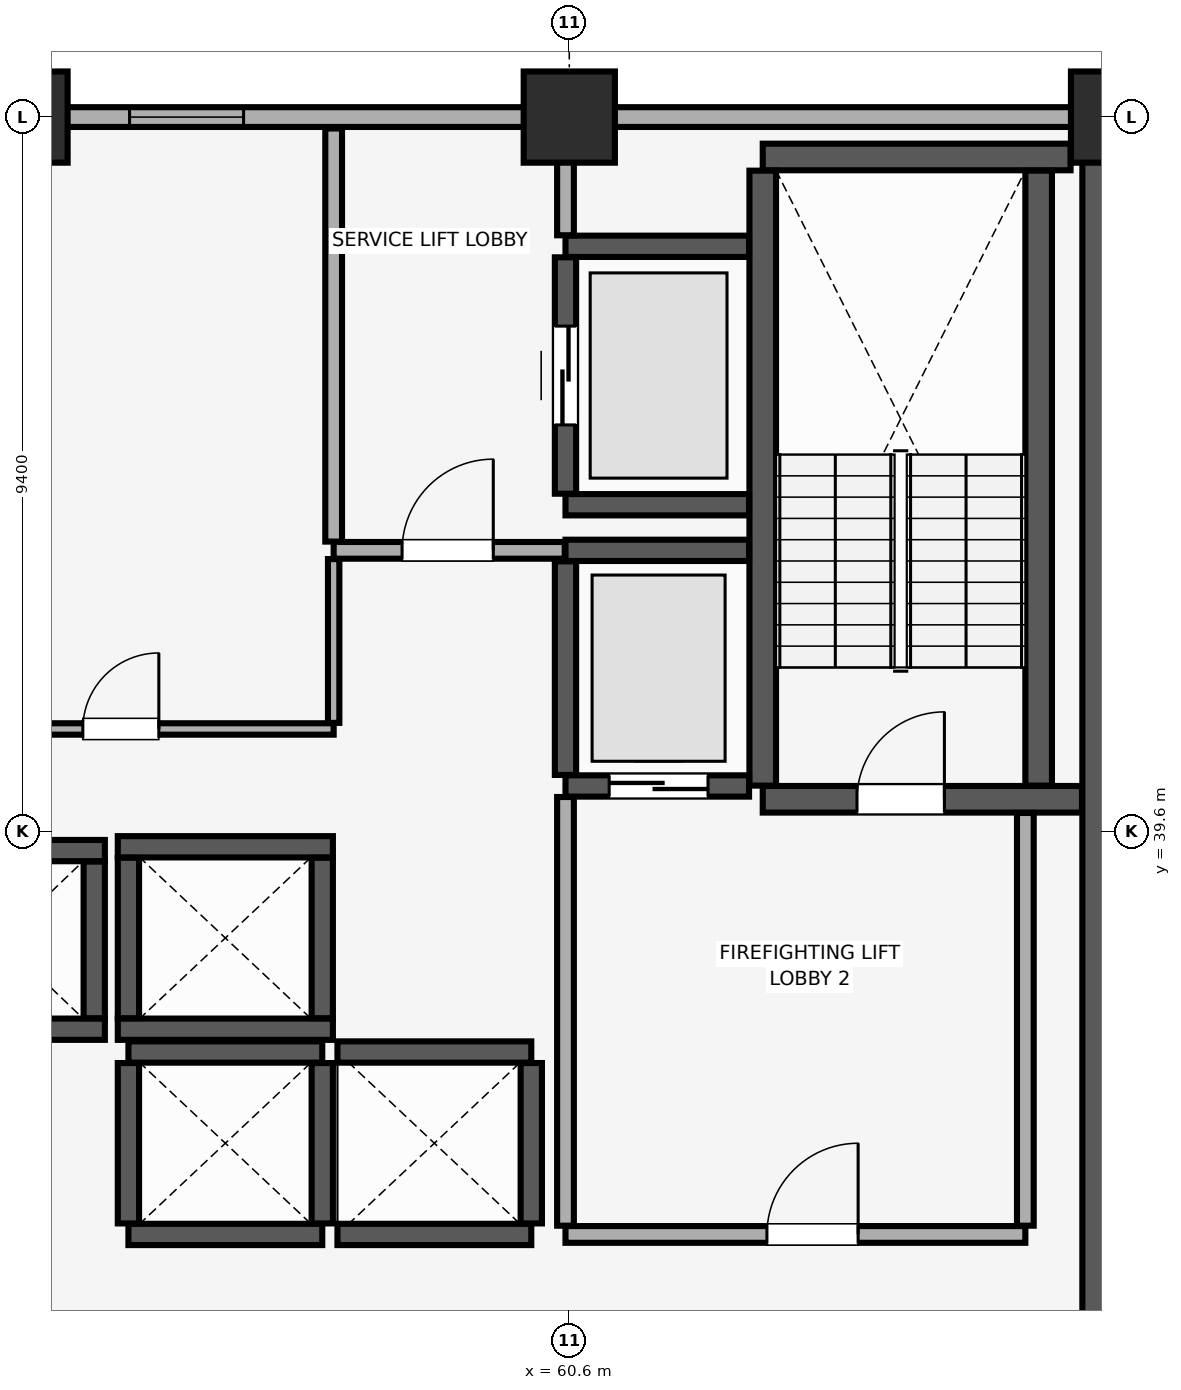
"""IFC4 building model, lengths in metres.
Left out: names, types, materials, properties, quantities, classifications, styles, units other than length and angle.
Written with IfcOpenShell. Run it as: python <this file> out.ifc"""

import sys

from ifc_helpers import new_model, si_unit, direction, frame, frame_2d, origin, origin_2d, place, context, subcontext, project, spatial, rectangle, extrude, element, fill, save


model = new_model("IFC4")
c1 = context("Model", 3, precision=1e-05, world=origin(), true_north=direction((0.0, 1.0)))
c2 = subcontext(c1, "Body", "Model", "MODEL_VIEW")
j1 = project(units=[si_unit("LENGTHUNIT", "METRE"), si_unit("PLANEANGLEUNIT", "RADIAN")], contexts=[c1])
p1 = place(None, origin())
s1 = spatial("IfcSite", under=j1, at=p1, CompositionType="ELEMENT")
p2 = place(p1, origin())
s2 = spatial("IfcBuilding", under=s1, at=p2, CompositionType="ELEMENT")
p3 = place(p2, frame((0.0, 0.0, 126.8)))
s3 = spatial("IfcBuildingStorey", under=s2, at=p3, CompositionType="ELEMENT", Elevation=126.8)
for number, where, z_axis, x_axis in (
    (1, (53.4, 49.0, 0.0), (0.0, 0.0, 1.0), (1.0, 0.0, 0.0)),
    (2, (60.6, 49.0, 0.0), (0.0, 0.0, 1.0), (1.0, 0.0, 0.0)),
    (3, (67.8, 49.0, 0.0), (0.0, 0.0, 1.0), (1.0, 0.0, 0.0)),
):
    element("IfcColumn", number, at=place(p3, frame(where, z_axis=z_axis, x_axis=x_axis)), inside=s3, PredefinedType="COLUMN", context=c2, shape_type="SweptSolid", body=[
        extrude(rectangle(XDim=1.2, YDim=1.2, at=origin_2d()), origin(), (0.0, 0.0, 1.0), 3.51),
    ])
p4 = place(p3, frame((79.8, 49.0, 0.0), z_axis=(0.0, 0.0, 1.0), x_axis=(-1.0, 0.0, 0.0)))
e4 = element("IfcWall", 4, at=p4, inside=s3, PredefinedType="SOLIDWALL", context=c2, shape_type="SweptSolid", body=[
    extrude(rectangle(XDim=75.6, YDim=0.26, at=frame_2d((37.8, 0.0))), origin(), (0.0, 0.0, 1.0), 2.56),
])
p5 = place(p4, frame((72.565, 0.0, 0.85)))
e5 = element("IfcOpeningElement", 5, at=p5, cuts=e4, PredefinedType="OPENING", context=c2, shape_type="SweptSolid", body=[
    extrude(rectangle(XDim=1.5, YDim=1.4, at=frame_2d((0.75, 0.7))), frame((0.0, 0.14, 0.0), z_axis=(0.0, -1.0, 0.0), x_axis=(1.0, 0.0, 0.0)), (0.0, 0.0, 1.0), 0.28),
])
p6 = place(p4, frame((67.45, 0.0, 0.85)))
e6 = element("IfcOpeningElement", 6, at=p6, cuts=e4, PredefinedType="OPENING", context=c2, shape_type="SweptSolid", body=[
    extrude(rectangle(XDim=1.5, YDim=1.4, at=frame_2d((0.75, 0.7))), frame((0.0, 0.14, 0.0), z_axis=(0.0, -1.0, 0.0), x_axis=(1.0, 0.0, 0.0)), (0.0, 0.0, 1.0), 0.28),
])
p7 = place(p4, frame((7.6, 0.0, 0.85)))
e7 = element("IfcOpeningElement", 7, at=p7, cuts=e4, PredefinedType="OPENING", context=c2, shape_type="SweptSolid", body=[
    extrude(rectangle(XDim=1.5, YDim=1.4, at=frame_2d((0.75, 0.7))), frame((0.0, 0.14, 0.0), z_axis=(0.0, -1.0, 0.0), x_axis=(1.0, 0.0, 0.0)), (0.0, 0.0, 1.0), 0.28),
])
p8 = place(p4, frame((1.535, 0.0, 0.85)))
e8 = element("IfcOpeningElement", 8, at=p8, cuts=e4, PredefinedType="OPENING", context=c2, shape_type="SweptSolid", body=[
    extrude(rectangle(XDim=1.5, YDim=1.4, at=frame_2d((0.75, 0.7))), frame((0.0, 0.14, 0.0), z_axis=(0.0, -1.0, 0.0), x_axis=(1.0, 0.0, 0.0)), (0.0, 0.0, 1.0), 0.28),
])
p9 = place(p4, frame((52.265, 0.0, 0.9)))
e9 = element("IfcOpeningElement", 9, at=p9, cuts=e4, PredefinedType="OPENING", context=c2, shape_type="SweptSolid", body=[
    extrude(rectangle(XDim=1.5, YDim=1.4, at=frame_2d((0.75, 0.7))), frame((0.0, 0.14, 0.0), z_axis=(0.0, -1.0, 0.0), x_axis=(1.0, 0.0, 0.0)), (0.0, 0.0, 1.0), 0.28),
])
p10 = place(p4, frame((45.5, 0.0, 0.9)))
e10 = element("IfcOpeningElement", 10, at=p10, cuts=e4, PredefinedType="OPENING", context=c2, shape_type="SweptSolid", body=[
    extrude(rectangle(XDim=1.5, YDim=1.4, at=frame_2d((0.75, 0.7))), frame((0.0, 0.14, 0.0), z_axis=(0.0, -1.0, 0.0), x_axis=(1.0, 0.0, 0.0)), (0.0, 0.0, 1.0), 0.28),
])
p11 = place(p4, frame((31.05, 0.0, 0.9)))
e11 = element("IfcOpeningElement", 11, at=p11, cuts=e4, PredefinedType="OPENING", context=c2, shape_type="SweptSolid", body=[
    extrude(rectangle(XDim=1.5, YDim=1.4, at=frame_2d((0.75, 0.7))), frame((0.0, 0.14, 0.0), z_axis=(0.0, -1.0, 0.0), x_axis=(1.0, 0.0, 0.0)), (0.0, 0.0, 1.0), 0.28),
])
p12 = place(p4, frame((27.85, 0.0, 0.9)))
e12 = element("IfcOpeningElement", 12, at=p12, cuts=e4, PredefinedType="OPENING", context=c2, shape_type="SweptSolid", body=[
    extrude(rectangle(XDim=1.5, YDim=1.4, at=frame_2d((0.75, 0.7))), frame((0.0, 0.14, 0.0), z_axis=(0.0, -1.0, 0.0), x_axis=(1.0, 0.0, 0.0)), (0.0, 0.0, 1.0), 0.28),
])
p13 = place(p4, frame((23.485, 0.0, 0.9)))
e13 = element("IfcOpeningElement", 13, at=p13, cuts=e4, PredefinedType="OPENING", context=c2, shape_type="SweptSolid", body=[
    extrude(rectangle(XDim=1.5, YDim=1.4, at=frame_2d((0.75, 0.7))), frame((0.0, 0.14, 0.0), z_axis=(0.0, -1.0, 0.0), x_axis=(1.0, 0.0, 0.0)), (0.0, 0.0, 1.0), 0.28),
])
p14 = place(p3, frame((67.8, 29.4, 0.0), z_axis=(0.0, 0.0, 1.0), x_axis=(0.0, 1.0, 0.0)))
e14 = element("IfcWall", 14, at=p14, inside=s3, PredefinedType="SHEAR", context=c2, shape_type="SweptSolid", body=[
    extrude(rectangle(XDim=19.2, YDim=0.9, at=frame_2d((9.6, 0.0))), origin(), (0.0, 0.0, 1.0), 3.51),
])
p15 = place(p3, frame((63.145, 40.025, 0.0), z_axis=(0.0, 0.0, 1.0), x_axis=(1.0, 0.0, 0.0)))
e15 = element("IfcWall", 15, at=p15, inside=s3, PredefinedType="SHEAR", context=c2, shape_type="SweptSolid", body=[
    extrude(rectangle(XDim=4.2, YDim=0.35, at=frame_2d((2.1, 0.0))), origin(), (0.0, 0.0, 1.0), 3.51),
])
p16 = place(p15, frame((1.24, 0.0, 0.0)))
e16 = element("IfcOpeningElement", 16, at=p16, cuts=e15, PredefinedType="OPENING", context=c2, shape_type="SweptSolid", body=[
    extrude(rectangle(XDim=1.15, YDim=2.15, at=frame_2d((0.575, 1.075))), frame((0.0, 0.185, 0.0), z_axis=(0.0, -1.0, 0.0), x_axis=(1.0, 0.0, 0.0)), (0.0, 0.0, 1.0), 0.37),
])
p17 = place(p3, frame((63.145, 48.475, 0.0), z_axis=(0.0, 0.0, 1.0), x_axis=(1.0, 0.0, 0.0)))
e17 = element("IfcWall", 17, at=p17, inside=s3, PredefinedType="SHEAR", context=c2, shape_type="SweptSolid", body=[
    extrude(rectangle(XDim=4.05, YDim=0.35, at=frame_2d((2.025, 0.0))), origin(), (0.0, 0.0, 1.0), 3.51),
])
for number, where, z_axis, x_axis in (
    (18, (63.145, 40.205, 0.0), (0.0, 0.0, 1.0), (0.0, 1.0, 0.0)),
    (19, (66.775, 40.205, 0.0), (0.0, 0.0, 1.0), (0.0, 1.0, 0.0)),
):
    element("IfcWall", number, at=place(p3, frame(where, z_axis=z_axis, x_axis=x_axis)), inside=s3, PredefinedType="SHEAR", context=c2, shape_type="SweptSolid", body=[
        extrude(rectangle(XDim=8.09, YDim=0.35, at=frame_2d((4.045, 0.0))), origin(), (0.0, 0.0, 1.0), 3.51),
    ])
for number, where, z_axis, x_axis in (
    (20, (51.9, 37.0, 0.0), (0.0, 0.0, 1.0), (1.0, 0.0, 0.0)),
    (21, (51.9, 39.35, 0.0), (0.0, 0.0, 1.0), (1.0, 0.0, 0.0)),
):
    element("IfcWall", number, at=place(p3, frame(where, z_axis=z_axis, x_axis=x_axis)), inside=s3, PredefinedType="SHEAR", context=c2, shape_type="SweptSolid", body=[
        extrude(rectangle(XDim=2.59, YDim=0.28, at=frame_2d((1.295, 0.0))), origin(), (0.0, 0.0, 1.0), 3.51),
    ])
p18 = place(p3, frame((54.35, 37.145, 0.0), z_axis=(0.0, 0.0, 1.0), x_axis=(0.0, 1.0, 0.0)))
e22 = element("IfcWall", 22, at=p18, inside=s3, PredefinedType="SHEAR", context=c2, shape_type="SweptSolid", body=[
    extrude(rectangle(XDim=2.06, YDim=0.28, at=frame_2d((1.03, 0.0))), origin(), (0.0, 0.0, 1.0), 3.51),
])
for number, where, z_axis, x_axis in (
    (23, (54.8, 34.3, 0.0), (0.0, 0.0, 1.0), (1.0, 0.0, 0.0)),
    (24, (54.8, 36.7, 0.0), (0.0, 0.0, 1.0), (1.0, 0.0, 0.0)),
):
    element("IfcWall", number, at=place(p3, frame(where, z_axis=z_axis, x_axis=x_axis)), inside=s3, PredefinedType="SHEAR", context=c2, shape_type="SweptSolid", body=[
        extrude(rectangle(XDim=2.55, YDim=0.28, at=frame_2d((1.275, 0.0))), origin(), (0.0, 0.0, 1.0), 3.51),
    ])
for number, where, z_axis, x_axis in (
    (25, (54.8, 34.445, 0.0), (0.0, 0.0, 1.0), (0.0, 1.0, 0.0)),
    (26, (57.35, 34.445, 0.0), (0.0, 0.0, 1.0), (0.0, 1.0, 0.0)),
):
    element("IfcWall", number, at=place(p3, frame(where, z_axis=z_axis, x_axis=x_axis)), inside=s3, PredefinedType="SHEAR", context=c2, shape_type="SweptSolid", body=[
        extrude(rectangle(XDim=2.11, YDim=0.28, at=frame_2d((1.055, 0.0))), origin(), (0.0, 0.0, 1.0), 3.51),
    ])
for number, where, z_axis, x_axis in (
    (27, (57.55, 34.3, 0.0), (0.0, 0.0, 1.0), (1.0, 0.0, 0.0)),
    (28, (57.55, 36.7, 0.0), (0.0, 0.0, 1.0), (1.0, 0.0, 0.0)),
):
    element("IfcWall", number, at=place(p3, frame(where, z_axis=z_axis, x_axis=x_axis)), inside=s3, PredefinedType="SHEAR", context=c2, shape_type="SweptSolid", body=[
        extrude(rectangle(XDim=2.55, YDim=0.28, at=frame_2d((1.275, 0.0))), origin(), (0.0, 0.0, 1.0), 3.51),
    ])
p19 = place(p3, frame((60.1, 34.445, 0.0), z_axis=(0.0, 0.0, 1.0), x_axis=(0.0, 1.0, 0.0)))
e29 = element("IfcWall", 29, at=p19, inside=s3, PredefinedType="SHEAR", context=c2, shape_type="SweptSolid", body=[
    extrude(rectangle(XDim=2.11, YDim=0.28, at=frame_2d((1.055, 0.0))), origin(), (0.0, 0.0, 1.0), 3.51),
])
for number, where, z_axis, x_axis in (
    (30, (54.66, 37.0, 0.0), (0.0, 0.0, 1.0), (1.0, 0.0, 0.0)),
    (31, (54.66, 39.4, 0.0), (0.0, 0.0, 1.0), (1.0, 0.0, 0.0)),
):
    element("IfcWall", number, at=place(p3, frame(where, z_axis=z_axis, x_axis=x_axis)), inside=s3, PredefinedType="SHEAR", context=c2, shape_type="SweptSolid", body=[
        extrude(rectangle(XDim=2.83, YDim=0.28, at=frame_2d((1.415, 0.0))), origin(), (0.0, 0.0, 1.0), 3.51),
    ])
for number, where, z_axis, x_axis in (
    (32, (54.8, 37.145, 0.0), (0.0, 0.0, 1.0), (0.0, 1.0, 0.0)),
    (33, (57.35, 37.145, 0.0), (0.0, 0.0, 1.0), (0.0, 1.0, 0.0)),
):
    element("IfcWall", number, at=place(p3, frame(where, z_axis=z_axis, x_axis=x_axis)), inside=s3, PredefinedType="SHEAR", context=c2, shape_type="SweptSolid", body=[
        extrude(rectangle(XDim=2.11, YDim=0.28, at=frame_2d((1.055, 0.0))), origin(), (0.0, 0.0, 1.0), 3.51),
    ])
p20 = place(p3, frame((60.55, 40.2, 0.0), z_axis=(0.0, 0.0, 1.0), x_axis=(1.0, 0.0, 0.0)))
e34 = element("IfcWall", 34, at=p20, inside=s3, PredefinedType="SHEAR", context=c2, shape_type="SweptSolid", body=[
    extrude(rectangle(XDim=2.415, YDim=0.28, at=frame_2d((1.208, 0.0))), origin(), (0.0, 0.0, 1.0), 3.51),
])
p21 = place(p20, frame((0.575, 0.0, 0.0)))
e35 = element("IfcOpeningElement", 35, at=p21, cuts=e34, PredefinedType="OPENING", context=c2, shape_type="SweptSolid", body=[
    extrude(rectangle(XDim=1.3, YDim=2.3, at=frame_2d((0.65, 1.15))), frame((0.0, 0.15, 0.0), z_axis=(0.0, -1.0, 0.0), x_axis=(1.0, 0.0, 0.0)), (0.0, 0.0, 1.0), 0.3),
])
p22 = place(p3, frame((60.55, 43.3, 0.0), z_axis=(0.0, 0.0, 1.0), x_axis=(1.0, 0.0, 0.0)))
e36 = element("IfcWall", 36, at=p22, inside=s3, PredefinedType="SHEAR", context=c2, shape_type="SweptSolid", body=[
    extrude(rectangle(XDim=2.415, YDim=0.28, at=frame_2d((1.208, 0.0))), origin(), (0.0, 0.0, 1.0), 3.51),
])
p23 = place(p3, frame((60.55, 40.345, 0.0), z_axis=(0.0, 0.0, 1.0), x_axis=(0.0, 1.0, 0.0)))
e37 = element("IfcWall", 37, at=p23, inside=s3, PredefinedType="SHEAR", context=c2, shape_type="SweptSolid", body=[
    extrude(rectangle(XDim=2.81, YDim=0.28, at=frame_2d((1.405, 0.0))), origin(), (0.0, 0.0, 1.0), 3.51),
])
for number, where, z_axis, x_axis in (
    (38, (60.55, 43.9, 0.0), (0.0, 0.0, 1.0), (1.0, 0.0, 0.0)),
    (39, (60.55, 47.3, 0.0), (0.0, 0.0, 1.0), (1.0, 0.0, 0.0)),
):
    element("IfcWall", number, at=place(p3, frame(where, z_axis=z_axis, x_axis=x_axis)), inside=s3, PredefinedType="SHEAR", context=c2, shape_type="SweptSolid", body=[
        extrude(rectangle(XDim=2.415, YDim=0.28, at=frame_2d((1.208, 0.0))), origin(), (0.0, 0.0, 1.0), 3.51),
    ])
p24 = place(p3, frame((60.55, 44.045, 0.0), z_axis=(0.0, 0.0, 1.0), x_axis=(0.0, 1.0, 0.0)))
e40 = element("IfcWall", 40, at=p24, inside=s3, PredefinedType="SHEAR", context=c2, shape_type="SweptSolid", body=[
    extrude(rectangle(XDim=3.11, YDim=0.28, at=frame_2d((1.555, 0.0))), origin(), (0.0, 0.0, 1.0), 3.51),
])
p25 = place(p24, frame((0.905, 0.0, 0.0)))
e41 = element("IfcOpeningElement", 41, at=p25, cuts=e40, PredefinedType="OPENING", context=c2, shape_type="SweptSolid", body=[
    extrude(rectangle(XDim=1.3, YDim=2.3, at=frame_2d((0.65, 1.15))), frame((0.0, 0.15, 0.0), z_axis=(0.0, -1.0, 0.0), x_axis=(1.0, 0.0, 0.0)), (0.0, 0.0, 1.0), 0.3),
])
p26 = place(p3, frame((60.55, 34.3, 0.0), z_axis=(0.0, 0.0, 1.0), x_axis=(1.0, 0.0, 0.0)))
e42 = element("IfcWall", 42, at=p26, inside=s3, PredefinedType="PARTITIONING", context=c2, shape_type="SweptSolid", body=[
    extrude(rectangle(XDim=6.05, YDim=0.22, at=frame_2d((3.025, 0.0))), origin(), (0.0, 0.0, 1.0), 3.51),
])
p27 = place(p26, frame((2.65, 0.0, 0.0)))
e43 = element("IfcOpeningElement", 43, at=p27, cuts=e42, PredefinedType="OPENING", context=c2, shape_type="SweptSolid", body=[
    extrude(rectangle(XDim=1.2, YDim=2.15, at=frame_2d((0.6, 1.075))), frame((0.0, 0.12, 0.0), z_axis=(0.0, -1.0, 0.0), x_axis=(1.0, 0.0, 0.0)), (0.0, 0.0, 1.0), 0.24),
])
p28 = place(p3, frame((60.55, 34.415, 0.0), z_axis=(0.0, 0.0, 1.0), x_axis=(0.0, 1.0, 0.0)))
e44 = element("IfcWall", 44, at=p28, inside=s3, PredefinedType="PARTITIONING", context=c2, shape_type="SweptSolid", body=[
    extrude(rectangle(XDim=5.64, YDim=0.22, at=frame_2d((2.82, 0.0))), origin(), (0.0, 0.0, 1.0), 3.51),
])
p29 = place(p3, frame((66.6, 34.415, 0.0), z_axis=(0.0, 0.0, 1.0), x_axis=(0.0, 1.0, 0.0)))
e45 = element("IfcWall", 45, at=p29, inside=s3, PredefinedType="PARTITIONING", context=c2, shape_type="SweptSolid", body=[
    extrude(rectangle(XDim=5.43, YDim=0.22, at=frame_2d((2.715, 0.0))), origin(), (0.0, 0.0, 1.0), 3.51),
])
p30 = place(p3, frame((57.5, 43.3, 0.0), z_axis=(0.0, 0.0, 1.0), x_axis=(1.0, 0.0, 0.0)))
e46 = element("IfcWall", 46, at=p30, inside=s3, PredefinedType="PARTITIONING", context=c2, shape_type="SweptSolid", body=[
    extrude(rectangle(XDim=3.04, YDim=0.22, at=frame_2d((1.52, 0.0))), origin(), (0.0, 0.0, 1.0), 3.51),
])
p31 = place(p30, frame((0.9, 0.0, 0.0)))
e47 = element("IfcOpeningElement", 47, at=p31, cuts=e46, PredefinedType="OPENING", context=c2, shape_type="SweptSolid", body=[
    extrude(rectangle(XDim=1.2, YDim=2.15, at=frame_2d((0.6, 1.075))), frame((0.0, 0.12, 0.0), z_axis=(0.0, -1.0, 0.0), x_axis=(1.0, 0.0, 0.0)), (0.0, 0.0, 1.0), 0.24),
])
p32 = place(p3, frame((57.5, 43.415, 0.0), z_axis=(0.0, 0.0, 1.0), x_axis=(0.0, 1.0, 0.0)))
e48 = element("IfcWall", 48, at=p32, inside=s3, PredefinedType="PARTITIONING", context=c2, shape_type="SweptSolid", body=[
    extrude(rectangle(XDim=5.435, YDim=0.22, at=frame_2d((2.718, 0.0))), origin(), (0.0, 0.0, 1.0), 3.51),
])
p33 = place(p3, frame((60.55, 47.445, 0.0), z_axis=(0.0, 0.0, 1.0), x_axis=(0.0, 1.0, 0.0)))
e49 = element("IfcWall", 49, at=p33, inside=s3, PredefinedType="PARTITIONING", context=c2, shape_type="SweptSolid", body=[
    extrude(rectangle(XDim=1.405, YDim=0.22, at=frame_2d((0.703, 0.0))), origin(), (0.0, 0.0, 1.0), 3.51),
])
p34 = place(p3, frame((49.48, 40.95, 0.0), z_axis=(0.0, 0.0, 1.0), x_axis=(1.0, 0.0, 0.0)))
e50 = element("IfcWall", 50, at=p34, inside=s3, PredefinedType="PARTITIONING", context=c2, shape_type="SweptSolid", body=[
    extrude(rectangle(XDim=8.02, YDim=0.15, at=frame_2d((4.01, 0.0))), origin(), (0.0, 0.0, 1.0), 3.51),
])
p35 = place(p34, frame((4.72, 0.0, 0.0)))
e51 = element("IfcOpeningElement", 51, at=p35, cuts=e50, PredefinedType="OPENING", context=c2, shape_type="SweptSolid", body=[
    extrude(rectangle(XDim=1.0, YDim=2.15, at=frame_2d((0.5, 1.075))), frame((0.0, 0.085, 0.0), z_axis=(0.0, -1.0, 0.0), x_axis=(1.0, 0.0, 0.0)), (0.0, 0.0, 1.0), 0.17),
])
p36 = place(p3, frame((57.5, 41.03, 0.0), z_axis=(0.0, 0.0, 1.0), x_axis=(0.0, 1.0, 0.0)))
e52 = element("IfcWall", 52, at=p36, inside=s3, PredefinedType="PARTITIONING", context=c2, shape_type="SweptSolid", body=[
    extrude(rectangle(XDim=2.155, YDim=0.15, at=frame_2d((1.078, 0.0))), origin(), (0.0, 0.0, 1.0), 3.51),
])
p37 = place(p13, origin())
e53 = element("IfcWindow", 53, at=p37, inside=s3, PartitioningType="SINGLE_PANEL", PredefinedType="WINDOW", context=c2, shape_type="SweptSolid", body=[
    extrude(rectangle(XDim=1.5, YDim=1.4, at=frame_2d((0.75, 0.7))), frame((0.0, 0.03, 0.0), z_axis=(0.0, -1.0, 0.0), x_axis=(1.0, 0.0, 0.0)), (0.0, 0.0, 1.0), 0.06),
])
fill(e13, e53)
p38 = place(p16, origin())
e54 = element("IfcDoor", 54, at=p38, inside=s3, OperationType="SINGLE_SWING_RIGHT", PredefinedType="DOOR", context=c2, shape_type="SweptSolid", body=[
    extrude(rectangle(XDim=1.15, YDim=2.15, at=frame_2d((0.575, 1.075))), frame((0.0, 0.025, 0.0), z_axis=(0.0, -1.0, 0.0), x_axis=(1.0, 0.0, 0.0)), (0.0, 0.0, 1.0), 0.05),
])
fill(e16, e54)
p39 = place(p21, origin())
e55 = element("IfcDoor", 55, at=p39, inside=s3, OperationType="DOUBLE_DOOR_SLIDING", PredefinedType="DOOR", context=c2, shape_type="SweptSolid", body=[
    extrude(rectangle(XDim=1.3, YDim=2.3, at=frame_2d((0.65, 1.15))), frame((0.0, 0.025, 0.0), z_axis=(0.0, -1.0, 0.0), x_axis=(1.0, 0.0, 0.0)), (0.0, 0.0, 1.0), 0.05),
])
fill(e35, e55)
p40 = place(p25, origin())
e56 = element("IfcDoor", 56, at=p40, inside=s3, OperationType="DOUBLE_DOOR_SLIDING", PredefinedType="DOOR", context=c2, shape_type="SweptSolid", body=[
    extrude(rectangle(XDim=1.3, YDim=2.3, at=frame_2d((0.65, 1.15))), frame((0.0, 0.025, 0.0), z_axis=(0.0, -1.0, 0.0), x_axis=(1.0, 0.0, 0.0)), (0.0, 0.0, 1.0), 0.05),
])
fill(e41, e56)
p41 = place(p27, origin())
e57 = element("IfcDoor", 57, at=p41, inside=s3, OperationType="SINGLE_SWING_RIGHT", PredefinedType="DOOR", context=c2, shape_type="SweptSolid", body=[
    extrude(rectangle(XDim=1.2, YDim=2.15, at=frame_2d((0.6, 1.075))), frame((0.0, 0.025, 0.0), z_axis=(0.0, -1.0, 0.0), x_axis=(1.0, 0.0, 0.0)), (0.0, 0.0, 1.0), 0.05),
])
fill(e43, e57)
p42 = place(p31, origin())
e58 = element("IfcDoor", 58, at=p42, inside=s3, OperationType="SINGLE_SWING_RIGHT", PredefinedType="DOOR", context=c2, shape_type="SweptSolid", body=[
    extrude(rectangle(XDim=1.2, YDim=2.15, at=frame_2d((0.6, 1.075))), frame((0.0, 0.025, 0.0), z_axis=(0.0, -1.0, 0.0), x_axis=(1.0, 0.0, 0.0)), (0.0, 0.0, 1.0), 0.05),
])
fill(e47, e58)
p43 = place(p35, origin())
e59 = element("IfcDoor", 59, at=p43, inside=s3, OperationType="SINGLE_SWING_RIGHT", PredefinedType="DOOR", context=c2, shape_type="SweptSolid", body=[
    extrude(rectangle(XDim=1.0, YDim=2.15, at=frame_2d((0.5, 1.075))), frame((0.0, 0.025, 0.0), z_axis=(0.0, -1.0, 0.0), x_axis=(1.0, 0.0, 0.0)), (0.0, 0.0, 1.0), 0.05),
])
fill(e51, e59)
save(model, sys.argv[1])
